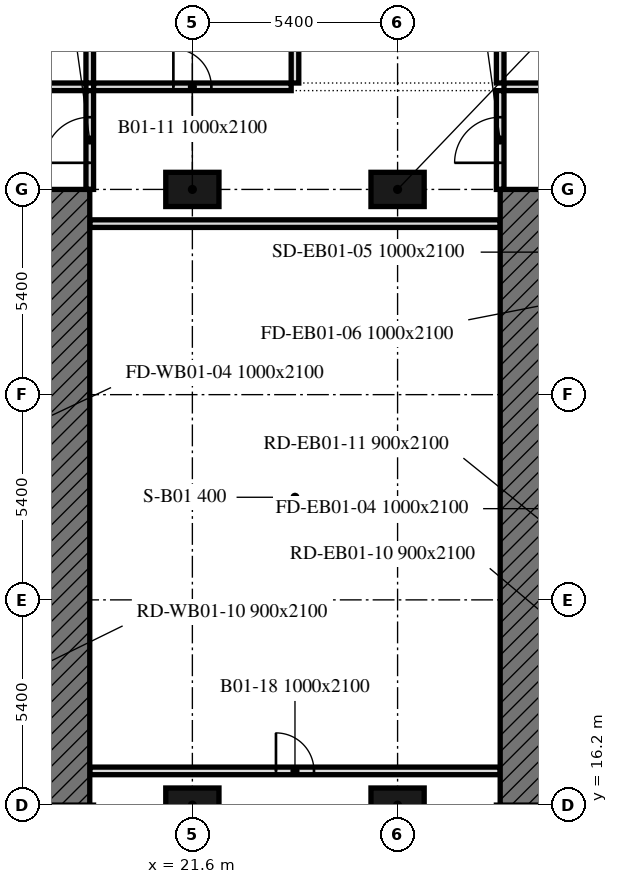
"""IFC4 building model, lengths in metres.
Left out: names, types, materials, properties, quantities, classifications, styles, units other than length and angle.
Written with IfcOpenShell. Run it as: python <this file> out.ifc"""

import sys

from ifc_helpers import new_model, si_unit, direction, frame, frame_2d, origin, origin_2d, place, context, subcontext, project, spatial, rectangle, extrude, element, fill, save


model = new_model("IFC4")
c1 = context("Model", 3, precision=1e-05, world=origin(), true_north=direction((0.0, 1.0)))
c2 = subcontext(c1, "Body", "Model", "MODEL_VIEW")
j1 = project(units=[si_unit("LENGTHUNIT", "METRE"), si_unit("PLANEANGLEUNIT", "RADIAN")], contexts=[c1])
p1 = place(None, origin())
s1 = spatial("IfcSite", under=j1, at=p1, CompositionType="ELEMENT")
p2 = place(p1, origin())
s2 = spatial("IfcBuilding", under=s1, at=p2, CompositionType="ELEMENT")
p3 = place(p2, frame((0.0, 0.0, -4.5)))
s3 = spatial("IfcBuildingStorey", under=s2, at=p3, CompositionType="ELEMENT", Elevation=-4.5)
for number, where, z_axis, x_axis in (
    (1, (21.6, 16.2, 0.0), (0.0, 0.0, 1.0), (1.0, 0.0, 0.0)),
    (2, (27.0, 16.2, 0.0), (0.0, 0.0, 1.0), (1.0, 0.0, 0.0)),
    (3, (21.6, 32.4, 0.0), (0.0, 0.0, 1.0), (1.0, 0.0, 0.0)),
    (4, (27.0, 32.4, 0.0), (0.0, 0.0, 1.0), (1.0, 0.0, 0.0)),
):
    element("IfcColumn", number, at=place(p3, frame(where, z_axis=z_axis, x_axis=x_axis)), inside=s3, PredefinedType="COLUMN", context=c2, shape_type="SweptSolid", body=[
        extrude(rectangle(XDim=1.4, YDim=0.9, at=origin_2d()), origin(), (0.0, 0.0, 1.0), 4.0),
    ])
for number, where, z_axis, x_axis in (
    (5, (18.9, 35.2, 0.0), (0.0, 0.0, 1.0), (0.0, 1.0, 0.0)),
    (6, (24.3, 35.2, 0.0), (0.0, 0.0, 1.0), (0.0, 1.0, 0.0)),
    (7, (29.7, 35.2, 0.0), (0.0, 0.0, 1.0), (0.0, 1.0, 0.0)),
):
    element("IfcWall", number, at=place(p3, frame(where, z_axis=z_axis, x_axis=x_axis)), inside=s3, PredefinedType="PARTITIONING", context=c2, shape_type="SweptSolid", body=[
        extrude(rectangle(XDim=8.8, YDim=0.2, at=frame_2d((4.4, 0.0))), origin(), (0.0, 0.0, 1.0), 4.0),
    ])
p4 = place(p3, frame((4.6, 35.1, 0.0), z_axis=(0.0, 0.0, 1.0), x_axis=(1.0, 0.0, 0.0)))
e8 = element("IfcWall", 8, at=p4, inside=s3, PredefinedType="PARTITIONING", context=c2, shape_type="SweptSolid", body=[
    extrude(rectangle(XDim=14.2, YDim=0.2, at=frame_2d((7.1, 0.0))), origin(), (0.0, 0.0, 1.0), 4.0),
])
p5 = place(p4, frame((6.6, 0.0, 0.0)))
e9 = element("IfcOpeningElement", 9, at=p5, cuts=e8, PredefinedType="OPENING", context=c2, shape_type="SweptSolid", body=[
    extrude(rectangle(XDim=1.0, YDim=2.1, at=frame_2d((0.5, 1.05))), frame((0.0, 0.11, 0.0), z_axis=(0.0, -1.0, 0.0), x_axis=(1.0, 0.0, 0.0)), (0.0, 0.0, 1.0), 0.22),
])
p6 = place(p3, frame((19.0, 35.1, 0.0), z_axis=(0.0, 0.0, 1.0), x_axis=(1.0, 0.0, 0.0)))
e10 = element("IfcWall", 10, at=p6, inside=s3, PredefinedType="PARTITIONING", context=c2, shape_type="SweptSolid", body=[
    extrude(rectangle(XDim=5.2, YDim=0.2, at=frame_2d((2.6, 0.0))), origin(), (0.0, 0.0, 1.0), 4.0),
])
p7 = place(p6, frame((2.1, 0.0, 0.0)))
e11 = element("IfcOpeningElement", 11, at=p7, cuts=e10, PredefinedType="OPENING", context=c2, shape_type="SweptSolid", body=[
    extrude(rectangle(XDim=1.0, YDim=2.1, at=frame_2d((0.5, 1.05))), frame((0.0, 0.11, 0.0), z_axis=(0.0, -1.0, 0.0), x_axis=(1.0, 0.0, 0.0)), (0.0, 0.0, 1.0), 0.22),
])
p8 = place(p3, frame((29.8, 35.1, 0.0), z_axis=(0.0, 0.0, 1.0), x_axis=(1.0, 0.0, 0.0)))
e12 = element("IfcWall", 12, at=p8, inside=s3, PredefinedType="PARTITIONING", context=c2, shape_type="SweptSolid", body=[
    extrude(rectangle(XDim=5.2, YDim=0.2, at=frame_2d((2.6, 0.0))), origin(), (0.0, 0.0, 1.0), 4.0),
])
p9 = place(p8, frame((2.1, 0.0, 0.0)))
e13 = element("IfcOpeningElement", 13, at=p9, cuts=e12, PredefinedType="OPENING", context=c2, shape_type="SweptSolid", body=[
    extrude(rectangle(XDim=1.0, YDim=2.1, at=frame_2d((0.5, 1.05))), frame((0.0, 0.11, 0.0), z_axis=(0.0, -1.0, 0.0), x_axis=(1.0, 0.0, 0.0)), (0.0, 0.0, 1.0), 0.22),
])
p10 = place(p3, frame((18.9, 32.4, 0.0), z_axis=(0.0, 0.0, 1.0), x_axis=(0.0, 1.0, 0.0)))
e14 = element("IfcWall", 14, at=p10, inside=s3, PredefinedType="PARTITIONING", context=c2, shape_type="SweptSolid", body=[
    extrude(rectangle(XDim=2.6, YDim=0.2, at=frame_2d((1.3, 0.0))), origin(), (0.0, 0.0, 1.0), 4.0),
])
p11 = place(p10, frame((0.7, 0.0, 0.0)))
e15 = element("IfcOpeningElement", 15, at=p11, cuts=e14, PredefinedType="OPENING", context=c2, shape_type="SweptSolid", body=[
    extrude(rectangle(XDim=1.2, YDim=2.1, at=frame_2d((0.6, 1.05))), frame((0.0, 0.11, 0.0), z_axis=(0.0, -1.0, 0.0), x_axis=(1.0, 0.0, 0.0)), (0.0, 0.0, 1.0), 0.22),
])
p12 = place(p3, frame((29.7, 32.4, 0.0), z_axis=(0.0, 0.0, 1.0), x_axis=(0.0, 1.0, 0.0)))
e16 = element("IfcWall", 16, at=p12, inside=s3, PredefinedType="PARTITIONING", context=c2, shape_type="SweptSolid", body=[
    extrude(rectangle(XDim=2.6, YDim=0.2, at=frame_2d((1.3, 0.0))), origin(), (0.0, 0.0, 1.0), 4.0),
])
p13 = place(p12, frame((0.7, 0.0, 0.0)))
e17 = element("IfcOpeningElement", 17, at=p13, cuts=e16, PredefinedType="OPENING", context=c2, shape_type="SweptSolid", body=[
    extrude(rectangle(XDim=1.2, YDim=2.1, at=frame_2d((0.6, 1.05))), frame((0.0, 0.11, 0.0), z_axis=(0.0, -1.0, 0.0), x_axis=(1.0, 0.0, 0.0)), (0.0, 0.0, 1.0), 0.22),
])
p14 = place(p3, frame((18.9, 17.1, 0.0), z_axis=(0.0, 0.0, 1.0), x_axis=(1.0, 0.0, 0.0)))
e18 = element("IfcWall", 18, at=p14, inside=s3, PredefinedType="PARTITIONING", context=c2, shape_type="SweptSolid", body=[
    extrude(rectangle(XDim=10.8, YDim=0.2, at=frame_2d((5.4, 0.0))), origin(), (0.0, 0.0, 1.0), 4.0),
])
p15 = place(p14, frame((4.9, 0.0, 0.0)))
e19 = element("IfcOpeningElement", 19, at=p15, cuts=e18, PredefinedType="OPENING", context=c2, shape_type="SweptSolid", body=[
    extrude(rectangle(XDim=1.0, YDim=2.1, at=frame_2d((0.5, 1.05))), frame((0.0, 0.11, 0.0), z_axis=(0.0, -1.0, 0.0), x_axis=(1.0, 0.0, 0.0)), (0.0, 0.0, 1.0), 0.22),
])
p16 = place(p3, frame((18.9, 31.5, 0.0), z_axis=(0.0, 0.0, 1.0), x_axis=(1.0, 0.0, 0.0)))
e20 = element("IfcWall", 20, at=p16, inside=s3, PredefinedType="PARTITIONING", context=c2, shape_type="SweptSolid", body=[
    extrude(rectangle(XDim=10.8, YDim=0.2, at=frame_2d((5.4, 0.0))), origin(), (0.0, 0.0, 1.0), 4.0),
])
for number, where, z_axis, x_axis in (
    (21, (18.3, 32.4, 0.0), (0.0, 0.0, 1.0), (0.0, -1.0, 0.0)),
    (22, (30.3, 16.2, 0.0), (0.0, 0.0, 1.0), (0.0, 1.0, 0.0)),
):
    element("IfcWall", number, at=place(p3, frame(where, z_axis=z_axis, x_axis=x_axis)), inside=s3, PredefinedType="SOLIDWALL", context=c2, shape_type="SweptSolid", body=[
        extrude(rectangle(XDim=16.2, YDim=1.2, at=frame_2d((8.1, 0.0))), origin(), (0.0, 0.0, 1.0), 4.0),
    ])
p17 = place(p7, origin())
e23 = element("IfcDoor", 23, at=p17, inside=s3, OperationType="SINGLE_SWING_LEFT", PredefinedType="DOOR", context=c2, shape_type="SweptSolid", body=[
    extrude(rectangle(XDim=1.0, YDim=2.1, at=frame_2d((0.5, 1.05))), frame((0.0, 0.025, 0.0), z_axis=(0.0, -1.0, 0.0), x_axis=(1.0, 0.0, 0.0)), (0.0, 0.0, 1.0), 0.05),
])
fill(e11, e23)
p18 = place(p11, origin())
e24 = element("IfcDoor", 24, at=p18, inside=s3, OperationType="SINGLE_SWING_LEFT", PredefinedType="DOOR", context=c2, shape_type="SweptSolid", body=[
    extrude(rectangle(XDim=1.2, YDim=2.1, at=frame_2d((0.6, 1.05))), frame((0.0, 0.025, 0.0), z_axis=(0.0, -1.0, 0.0), x_axis=(1.0, 0.0, 0.0)), (0.0, 0.0, 1.0), 0.05),
])
fill(e15, e24)
p19 = place(p13, origin())
e25 = element("IfcDoor", 25, at=p19, inside=s3, OperationType="SINGLE_SWING_LEFT", PredefinedType="DOOR", context=c2, shape_type="SweptSolid", body=[
    extrude(rectangle(XDim=1.2, YDim=2.1, at=frame_2d((0.6, 1.05))), frame((0.0, 0.025, 0.0), z_axis=(0.0, -1.0, 0.0), x_axis=(1.0, 0.0, 0.0)), (0.0, 0.0, 1.0), 0.05),
])
fill(e17, e25)
p20 = place(p15, origin())
e26 = element("IfcDoor", 26, at=p20, inside=s3, OperationType="SINGLE_SWING_LEFT", PredefinedType="DOOR", context=c2, shape_type="SweptSolid", body=[
    extrude(rectangle(XDim=1.0, YDim=2.1, at=frame_2d((0.5, 1.05))), frame((0.0, 0.025, 0.0), z_axis=(0.0, -1.0, 0.0), x_axis=(1.0, 0.0, 0.0)), (0.0, 0.0, 1.0), 0.05),
])
fill(e19, e26)
save(model, sys.argv[1])
